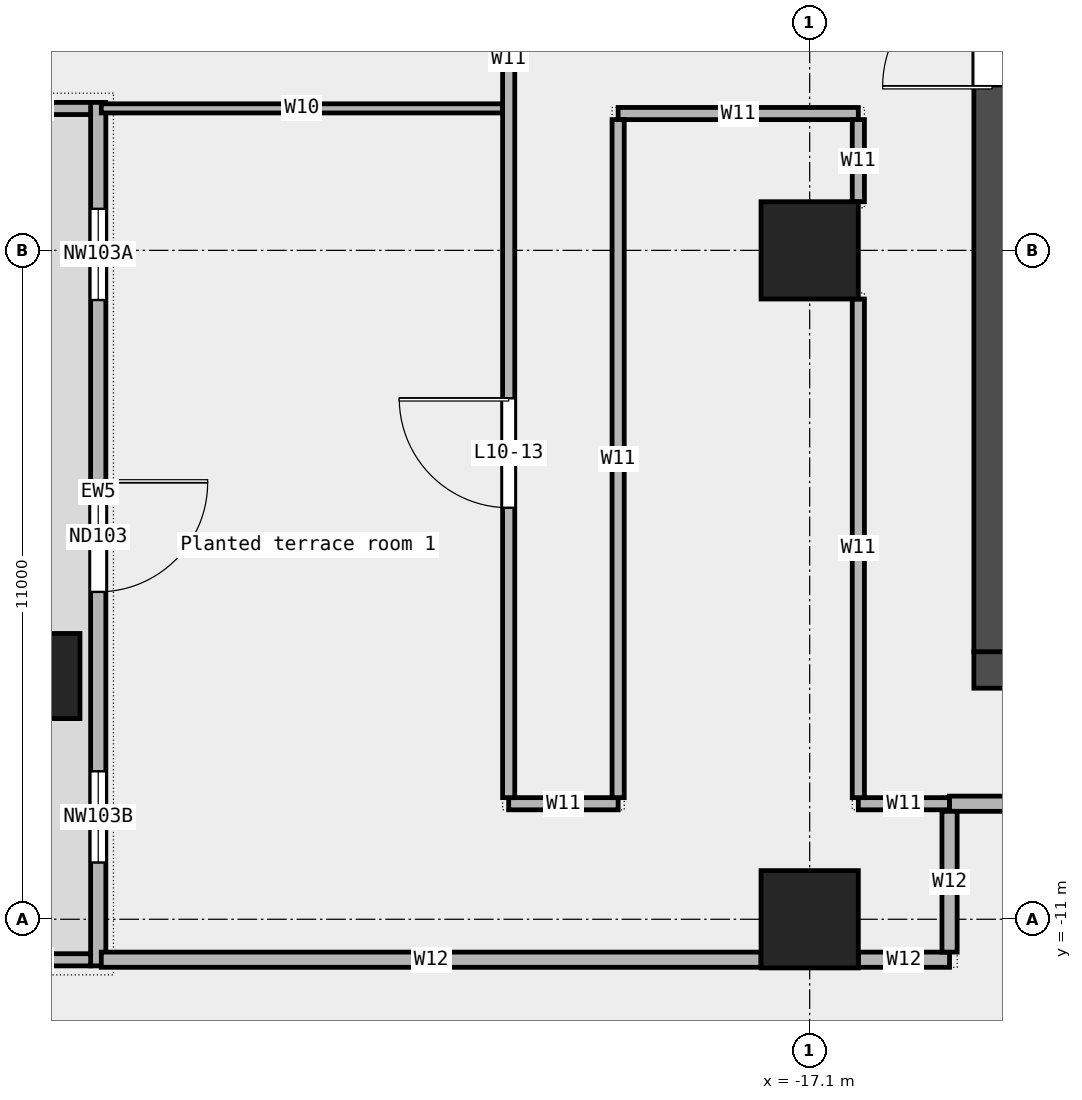
"""IFC4 building model, lengths in metres.
Left out: names, types, materials, properties, quantities, classifications, styles, units other than length and angle.
Written with IfcOpenShell. Run it as: python <this file> out.ifc"""

import sys

from ifc_helpers import new_model, si_unit, direction, frame, frame_2d, origin, origin_2d, place, context, subcontext, project, spatial, rectangle, extrude, element, fill, save


model = new_model("IFC4")
c1 = context("Model", 3, precision=1e-05, world=origin(), true_north=direction((0.0, 1.0)))
c2 = subcontext(c1, "Body", "Model", "MODEL_VIEW")
j1 = project(units=[si_unit("LENGTHUNIT", "METRE"), si_unit("PLANEANGLEUNIT", "RADIAN")], contexts=[c1])
p1 = place(None, origin())
s1 = spatial("IfcSite", under=j1, at=p1, CompositionType="ELEMENT")
p2 = place(p1, origin())
s2 = spatial("IfcBuilding", under=s1, at=p2, CompositionType="ELEMENT")
p3 = place(p2, frame((0.0, 0.0, 55.0)))
s3 = spatial("IfcBuildingStorey", under=s2, at=p3, CompositionType="ELEMENT", Elevation=55.0)
p4 = place(p3, frame((-29.8, -7.0, 0.0), z_axis=(0.0, 0.0, 1.0), x_axis=(1.0, 0.0, 0.0)))
e1 = element("IfcColumn", 1, at=p4, inside=s3, PredefinedType="COLUMN", context=c2, shape_type="SweptSolid", body=[
    extrude(rectangle(XDim=1.4, YDim=1.4, at=origin_2d()), origin(), (0.0, 0.0, 1.0), 4.35),
])
for number, where, z_axis, x_axis in (
    (2, (-17.1, -11.0, 0.0), (0.0, 0.0, 1.0), (1.0, 0.0, 0.0)),
    (3, (-17.1, 0.0, 0.0), (0.0, 0.0, 1.0), (1.0, 0.0, 0.0)),
):
    element("IfcColumn", number, at=place(p3, frame(where, z_axis=z_axis, x_axis=x_axis)), inside=s3, PredefinedType="COLUMN", context=c2, shape_type="SweptSolid", body=[
        extrude(rectangle(XDim=1.6, YDim=1.6, at=origin_2d()), origin(), (0.0, 0.0, 1.0), 4.35),
    ])
p5 = place(p3, frame((-28.8, 2.433, 0.0), z_axis=(0.0, 0.0, 1.0), x_axis=(0.0, -1.0, 0.0)))
e4 = element("IfcWall", 4, at=p5, inside=s3, PredefinedType="STANDARD", context=c2, shape_type="SweptSolid", body=[
    extrude(rectangle(XDim=14.2, YDim=0.25, at=frame_2d((7.1, 0.0))), origin(), (0.0, 0.0, 1.0), 4.35),
])
p6 = place(p5, frame((1.75, 0.0, 0.45)))
e5 = element("IfcOpeningElement", 5, at=p6, cuts=e4, PredefinedType="OPENING", context=c2, shape_type="SweptSolid", body=[
    extrude(rectangle(XDim=1.5, YDim=3.0, at=frame_2d((0.75, 1.5))), frame((0.0, 0.137, 0.0), z_axis=(0.0, -1.0, 0.0), x_axis=(1.0, 0.0, 0.0)), (0.0, 0.0, 1.0), 0.274),
])
p7 = place(p5, frame((6.25, 0.0, 0.0)))
e6 = element("IfcOpeningElement", 6, at=p7, cuts=e4, PredefinedType="OPENING", context=c2, shape_type="SweptSolid", body=[
    extrude(rectangle(XDim=1.8, YDim=2.4, at=frame_2d((0.9, 1.2))), frame((0.0, 0.137, 0.0), z_axis=(0.0, -1.0, 0.0), x_axis=(1.0, 0.0, 0.0)), (0.0, 0.0, 1.0), 0.274),
])
p8 = place(p5, frame((11.0, 0.0, 0.45)))
e7 = element("IfcOpeningElement", 7, at=p8, cuts=e4, PredefinedType="OPENING", context=c2, shape_type="SweptSolid", body=[
    extrude(rectangle(XDim=1.5, YDim=3.0, at=frame_2d((0.75, 1.5))), frame((0.0, 0.137, 0.0), z_axis=(0.0, -1.0, 0.0), x_axis=(1.0, 0.0, 0.0)), (0.0, 0.0, 1.0), 0.274),
])
for number, where, z_axis, x_axis in (
    (8, (-30.8, 2.333, 0.0), (0.0, 0.0, 1.0), (1.0, 0.0, 0.0)),
    (9, (-30.8, -11.667, 0.0), (0.0, 0.0, 1.0), (1.0, 0.0, 0.0)),
):
    element("IfcWall", number, at=place(p3, frame(where, z_axis=z_axis, x_axis=x_axis)), inside=s3, PredefinedType="STANDARD", context=c2, shape_type="SweptSolid", body=[
        extrude(rectangle(XDim=1.875, YDim=0.2, at=frame_2d((0.938, 0.0))), origin(), (0.0, 0.0, 1.0), 4.35),
    ])
p9 = place(p3, frame((-28.75, -11.665, 0.0), z_axis=(0.0, 0.0, 1.0), x_axis=(1.0, 0.0, 0.0)))
e10 = element("IfcWall", 10, at=p9, inside=s3, PredefinedType="PARTITIONING", context=c2, shape_type="SweptSolid", body=[
    extrude(rectangle(XDim=10.85, YDim=0.25, at=frame_2d((5.425, 0.0))), origin(), (0.0, 0.0, 1.0), 4.35),
])
p10 = place(p3, frame((-16.3, -11.665, 0.0), z_axis=(0.0, 0.0, 1.0), x_axis=(1.0, 0.0, 0.0)))
e11 = element("IfcWall", 11, at=p10, inside=s3, PredefinedType="PARTITIONING", context=c2, shape_type="SweptSolid", body=[
    extrude(rectangle(XDim=1.5, YDim=0.25, at=frame_2d((0.75, 0.0))), origin(), (0.0, 0.0, 1.0), 4.35),
])
p11 = place(p3, frame((-22.05, -9.1, 0.0), z_axis=(0.0, 0.0, 1.0), x_axis=(1.0, 0.0, 0.0)))
e12 = element("IfcWall", 12, at=p11, inside=s3, PredefinedType="PARTITIONING", context=c2, shape_type="SweptSolid", body=[
    extrude(rectangle(XDim=1.8, YDim=0.2, at=frame_2d((0.9, 0.0))), origin(), (0.0, 0.0, 1.0), 4.35),
])
p12 = place(p3, frame((-16.3, -9.1, 0.0), z_axis=(0.0, 0.0, 1.0), x_axis=(1.0, 0.0, 0.0)))
e13 = element("IfcWall", 13, at=p12, inside=s3, PredefinedType="PARTITIONING", context=c2, shape_type="SweptSolid", body=[
    extrude(rectangle(XDim=1.5, YDim=0.2, at=frame_2d((0.75, 0.0))), origin(), (0.0, 0.0, 1.0), 4.35),
])
p13 = place(p3, frame((-14.8, -9.1, 0.0), z_axis=(0.0, 0.0, 1.0), x_axis=(1.0, 0.0, 0.0)))
e14 = element("IfcWall", 14, at=p13, inside=s3, PredefinedType="PARTITIONING", context=c2, shape_type="SweptSolid", body=[
    extrude(rectangle(XDim=29.6, YDim=0.25, at=frame_2d((14.8, 0.0))), origin(), (0.0, 0.0, 1.0), 4.35),
])
p14 = place(p13, frame((4.802, 0.0, 0.0)))
e15 = element("IfcOpeningElement", 15, at=p14, cuts=e14, PredefinedType="OPENING", context=c2, shape_type="SweptSolid", body=[
    extrude(rectangle(XDim=1.8, YDim=2.1, at=frame_2d((0.9, 1.05))), frame((0.0, 0.137, 0.0), z_axis=(0.0, -1.0, 0.0), x_axis=(1.0, 0.0, 0.0)), (0.0, 0.0, 1.0), 0.274),
])
p15 = place(p13, frame((21.403, 0.0, 0.0)))
e16 = element("IfcOpeningElement", 16, at=p15, cuts=e14, PredefinedType="OPENING", context=c2, shape_type="SweptSolid", body=[
    extrude(rectangle(XDim=1.8, YDim=2.1, at=frame_2d((0.9, 1.05))), frame((0.0, 0.137, 0.0), z_axis=(0.0, -1.0, 0.0), x_axis=(1.0, 0.0, 0.0)), (0.0, 0.0, 1.0), 0.274),
])
p16 = place(p3, frame((-20.25, 2.25, 0.0), z_axis=(0.0, 0.0, 1.0), x_axis=(1.0, 0.0, 0.0)))
e17 = element("IfcWall", 17, at=p16, inside=s3, PredefinedType="PARTITIONING", context=c2, shape_type="SweptSolid", body=[
    extrude(rectangle(XDim=3.95, YDim=0.2, at=frame_2d((1.975, 0.0))), origin(), (0.0, 0.0, 1.0), 4.35),
])
p17 = place(p3, frame((-28.75, 2.335, 0.0), z_axis=(0.0, 0.0, 1.0), x_axis=(1.0, 0.0, 0.0)))
e18 = element("IfcWall", 18, at=p17, inside=s3, PredefinedType="PARTITIONING", context=c2, shape_type="SweptSolid", body=[
    extrude(rectangle(XDim=6.6, YDim=0.15, at=frame_2d((3.3, 0.0))), origin(), (0.0, 0.0, 1.0), 4.35),
])
p18 = place(p3, frame((-22.05, -9.0, 0.0), z_axis=(0.0, 0.0, 1.0), x_axis=(0.0, 1.0, 0.0)))
e19 = element("IfcWall", 19, at=p18, inside=s3, PredefinedType="PARTITIONING", context=c2, shape_type="SweptSolid", body=[
    extrude(rectangle(XDim=24.3, YDim=0.2, at=frame_2d((12.15, 0.0))), origin(), (0.0, 0.0, 1.0), 4.35),
])
p19 = place(p18, frame((17.067, 0.0, 0.0)))
e20 = element("IfcOpeningElement", 20, at=p19, cuts=e19, PredefinedType="OPENING", context=c2, shape_type="SweptSolid", body=[
    extrude(rectangle(XDim=1.5, YDim=2.1, at=frame_2d((0.75, 1.05))), frame((0.0, 0.112, 0.0), z_axis=(0.0, -1.0, 0.0), x_axis=(1.0, 0.0, 0.0)), (0.0, 0.0, 1.0), 0.224),
])
p20 = place(p18, frame((4.768, 0.0, 0.0)))
e21 = element("IfcOpeningElement", 21, at=p20, cuts=e19, PredefinedType="OPENING", context=c2, shape_type="SweptSolid", body=[
    extrude(rectangle(XDim=1.8, YDim=2.1, at=frame_2d((0.9, 1.05))), frame((0.0, 0.112, 0.0), z_axis=(0.0, -1.0, 0.0), x_axis=(1.0, 0.0, 0.0)), (0.0, 0.0, 1.0), 0.224),
])
p21 = place(p3, frame((-20.25, -9.0, 0.0), z_axis=(0.0, 0.0, 1.0), x_axis=(0.0, 1.0, 0.0)))
e22 = element("IfcWall", 22, at=p21, inside=s3, PredefinedType="PARTITIONING", context=c2, shape_type="SweptSolid", body=[
    extrude(rectangle(XDim=11.15, YDim=0.2, at=frame_2d((5.575, 0.0))), origin(), (0.0, 0.0, 1.0), 4.35),
])
p22 = place(p3, frame((-16.3, -9.0, 0.0), z_axis=(0.0, 0.0, 1.0), x_axis=(0.0, 1.0, 0.0)))
e23 = element("IfcWall", 23, at=p22, inside=s3, PredefinedType="PARTITIONING", context=c2, shape_type="SweptSolid", body=[
    extrude(rectangle(XDim=8.2, YDim=0.2, at=frame_2d((4.1, 0.0))), origin(), (0.0, 0.0, 1.0), 4.35),
])
p23 = place(p3, frame((-16.3, 0.8, 0.0), z_axis=(0.0, 0.0, 1.0), x_axis=(0.0, 1.0, 0.0)))
e24 = element("IfcWall", 24, at=p23, inside=s3, PredefinedType="PARTITIONING", context=c2, shape_type="SweptSolid", body=[
    extrude(rectangle(XDim=1.35, YDim=0.2, at=frame_2d((0.675, 0.0))), origin(), (0.0, 0.0, 1.0), 4.35),
])
p24 = place(p3, frame((-14.8, -11.54, 0.0), z_axis=(0.0, 0.0, 1.0), x_axis=(0.0, 1.0, 0.0)))
e25 = element("IfcWall", 25, at=p24, inside=s3, PredefinedType="PARTITIONING", context=c2, shape_type="SweptSolid", body=[
    extrude(rectangle(XDim=2.315, YDim=0.25, at=frame_2d((1.157, 0.0))), origin(), (0.0, 0.0, 1.0), 4.35),
])
p25 = place(p3, frame((-14.4, -6.9, 0.0), z_axis=(0.0, 0.0, 1.0), x_axis=(1.0, 0.0, 0.0)))
e26 = element("IfcWall", 26, at=p25, inside=s3, PredefinedType="SHEAR", context=c2, shape_type="SweptSolid", body=[
    extrude(rectangle(XDim=28.8, YDim=0.6, at=frame_2d((14.4, 0.0))), origin(), (0.0, 0.0, 1.0), 4.5),
])
p26 = place(p25, frame((4.9, 0.0, 0.0)))
e27 = element("IfcOpeningElement", 27, at=p26, cuts=e26, PredefinedType="OPENING", context=c2, shape_type="SweptSolid", body=[
    extrude(rectangle(XDim=1.0, YDim=2.1, at=frame_2d((0.5, 1.05))), frame((0.0, 0.312, 0.0), z_axis=(0.0, -1.0, 0.0), x_axis=(1.0, 0.0, 0.0)), (0.0, 0.0, 1.0), 0.624),
])
p27 = place(p25, frame((8.462, 0.0, 0.0)))
e28 = element("IfcOpeningElement", 28, at=p27, cuts=e26, PredefinedType="OPENING", context=c2, shape_type="SweptSolid", body=[
    extrude(rectangle(XDim=1.0, YDim=2.1, at=frame_2d((0.5, 1.05))), frame((0.0, 0.312, 0.0), z_axis=(0.0, -1.0, 0.0), x_axis=(1.0, 0.0, 0.0)), (0.0, 0.0, 1.0), 0.624),
])
p28 = place(p25, frame((13.425, 0.0, 0.0)))
e29 = element("IfcOpeningElement", 29, at=p28, cuts=e26, PredefinedType="OPENING", context=c2, shape_type="SweptSolid", body=[
    extrude(rectangle(XDim=1.2, YDim=2.1, at=frame_2d((0.6, 1.05))), frame((0.0, 0.312, 0.0), z_axis=(0.0, -1.0, 0.0), x_axis=(1.0, 0.0, 0.0)), (0.0, 0.0, 1.0), 0.624),
])
p29 = place(p25, frame((18.75, 0.0, 0.0)))
e30 = element("IfcOpeningElement", 30, at=p29, cuts=e26, PredefinedType="OPENING", context=c2, shape_type="SweptSolid", body=[
    extrude(rectangle(XDim=1.8, YDim=2.1, at=frame_2d((0.9, 1.05))), frame((0.0, 0.312, 0.0), z_axis=(0.0, -1.0, 0.0), x_axis=(1.0, 0.0, 0.0)), (0.0, 0.0, 1.0), 0.624),
])
p30 = place(p25, frame((23.087, 0.0, 0.0)))
e31 = element("IfcOpeningElement", 31, at=p30, cuts=e26, PredefinedType="OPENING", context=c2, shape_type="SweptSolid", body=[
    extrude(rectangle(XDim=1.0, YDim=2.1, at=frame_2d((0.5, 1.05))), frame((0.0, 0.312, 0.0), z_axis=(0.0, -1.0, 0.0), x_axis=(1.0, 0.0, 0.0)), (0.0, 0.0, 1.0), 0.624),
])
p31 = place(p3, frame((-14.1, -6.6, 0.0), z_axis=(0.0, 0.0, 1.0), x_axis=(0.0, 1.0, 0.0)))
e32 = element("IfcWall", 32, at=p31, inside=s3, PredefinedType="SHEAR", context=c2, shape_type="SweptSolid", body=[
    extrude(rectangle(XDim=19.5, YDim=0.6, at=frame_2d((9.75, 0.0))), origin(), (0.0, 0.0, 1.0), 4.5),
])
p32 = place(p31, frame((9.3, 0.0, 0.0)))
e33 = element("IfcOpeningElement", 33, at=p32, cuts=e32, PredefinedType="OPENING", context=c2, shape_type="SweptSolid", body=[
    extrude(rectangle(XDim=1.8, YDim=2.1, at=frame_2d((0.9, 1.05))), frame((0.0, 0.312, 0.0), z_axis=(0.0, -1.0, 0.0), x_axis=(1.0, 0.0, 0.0)), (0.0, 0.0, 1.0), 0.624),
])
p33 = place(p6, origin())
e34 = element("IfcWindow", 34, at=p33, inside=s3, PartitioningType="SINGLE_PANEL", PredefinedType="WINDOW", context=c2, shape_type="SweptSolid", body=[
    extrude(rectangle(XDim=1.5, YDim=3.0, at=frame_2d((0.75, 1.5))), frame((0.0, 0.03, 0.0), z_axis=(0.0, -1.0, 0.0), x_axis=(1.0, 0.0, 0.0)), (0.0, 0.0, 1.0), 0.06),
])
fill(e5, e34)
p34 = place(p7, origin())
e35 = element("IfcDoor", 35, at=p34, inside=s3, OperationType="DOUBLE_DOOR_SINGLE_SWING", PredefinedType="DOOR", context=c2, shape_type="SweptSolid", body=[
    extrude(rectangle(XDim=1.8, YDim=2.4, at=frame_2d((0.9, 1.2))), frame((0.0, 0.025, 0.0), z_axis=(0.0, -1.0, 0.0), x_axis=(1.0, 0.0, 0.0)), (0.0, 0.0, 1.0), 0.05),
])
fill(e6, e35)
p35 = place(p8, origin())
e36 = element("IfcWindow", 36, at=p35, inside=s3, PartitioningType="SINGLE_PANEL", PredefinedType="WINDOW", context=c2, shape_type="SweptSolid", body=[
    extrude(rectangle(XDim=1.5, YDim=3.0, at=frame_2d((0.75, 1.5))), frame((0.0, 0.03, 0.0), z_axis=(0.0, -1.0, 0.0), x_axis=(1.0, 0.0, 0.0)), (0.0, 0.0, 1.0), 0.06),
])
fill(e7, e36)
p36 = place(p20, origin())
e37 = element("IfcDoor", 37, at=p36, inside=s3, OperationType="DOUBLE_DOOR_SINGLE_SWING", PredefinedType="DOOR", context=c2, shape_type="SweptSolid", body=[
    extrude(rectangle(XDim=1.8, YDim=2.1, at=frame_2d((0.9, 1.05))), frame((0.0, 0.025, 0.0), z_axis=(0.0, -1.0, 0.0), x_axis=(1.0, 0.0, 0.0)), (0.0, 0.0, 1.0), 0.05),
])
fill(e21, e37)
p37 = place(p32, origin())
e38 = element("IfcDoor", 38, at=p37, inside=s3, OperationType="DOUBLE_DOOR_SINGLE_SWING", PredefinedType="DOOR", context=c2, shape_type="SweptSolid", body=[
    extrude(rectangle(XDim=1.8, YDim=2.1, at=frame_2d((0.9, 1.05))), frame((0.0, 0.025, 0.0), z_axis=(0.0, -1.0, 0.0), x_axis=(1.0, 0.0, 0.0)), (0.0, 0.0, 1.0), 0.05),
])
fill(e33, e38)
save(model, sys.argv[1])
